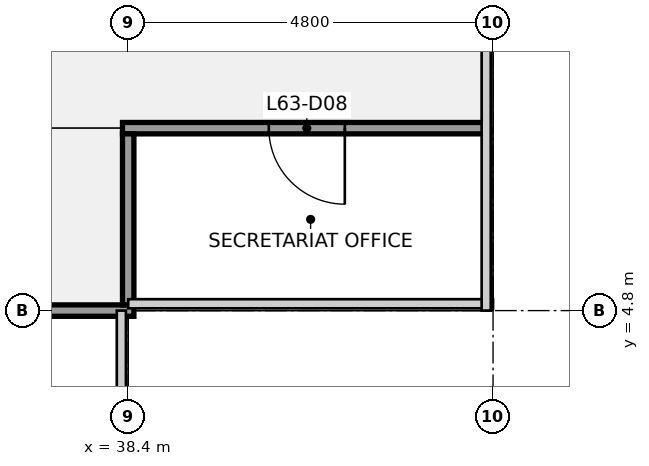
"""IFC4 building model, lengths in metres.
Left out: names, types, materials, properties, quantities, classifications, styles, units other than length and angle.
Written with IfcOpenShell. Run it as: python <this file> out.ifc"""

import sys

from ifc_helpers import new_model, si_unit, direction, frame, frame_2d, origin, place, context, subcontext, project, spatial, rectangle, extrude, element, fill, save


model = new_model("IFC4")
c1 = context("Model", 3, precision=1e-05, world=origin(), true_north=direction((0.0, 1.0)))
c2 = subcontext(c1, "Body", "Model", "MODEL_VIEW")
j1 = project(units=[si_unit("LENGTHUNIT", "METRE"), si_unit("PLANEANGLEUNIT", "RADIAN")], contexts=[c1])
p1 = place(None, origin())
s1 = spatial("IfcSite", under=j1, at=p1, CompositionType="ELEMENT")
p2 = place(p1, origin())
s2 = spatial("IfcBuilding", under=s1, at=p2, CompositionType="ELEMENT")
p3 = place(p2, frame((0.0, 0.0, 290.3)))
s3 = spatial("IfcBuildingStorey", under=s2, at=p3, CompositionType="ELEMENT", Elevation=290.3)
p4 = place(p3, frame((19.125, 4.8, 0.0), z_axis=(0.0, 0.0, 1.0), x_axis=(1.0, 0.0, 0.0)))
e1 = element("IfcWall", 1, at=p4, inside=s3, PredefinedType="PARTITIONING", context=c2, shape_type="SweptSolid", body=[
    extrude(rectangle(XDim=19.35, YDim=0.15, at=frame_2d((9.675, 0.0))), origin(), (0.0, 0.0, 1.0), 2.87),
])
p5 = place(p4, frame((0.775, 0.0, 0.0)))
e2 = element("IfcOpeningElement", 2, at=p5, cuts=e1, PredefinedType="OPENING", context=c2, shape_type="SweptSolid", body=[
    extrude(rectangle(XDim=1.0, YDim=2.1, at=frame_2d((0.5, 1.05))), frame((0.0, 0.085, 0.0), z_axis=(0.0, -1.0, 0.0), x_axis=(1.0, 0.0, 0.0)), (0.0, 0.0, 1.0), 0.17),
])
p6 = place(p4, frame((4.375, 0.0, 0.0)))
e3 = element("IfcOpeningElement", 3, at=p6, cuts=e1, PredefinedType="OPENING", context=c2, shape_type="SweptSolid", body=[
    extrude(rectangle(XDim=1.0, YDim=2.1, at=frame_2d((0.5, 1.05))), frame((0.0, 0.085, 0.0), z_axis=(0.0, -1.0, 0.0), x_axis=(1.0, 0.0, 0.0)), (0.0, 0.0, 1.0), 0.17),
])
p7 = place(p4, frame((7.975, 0.0, 0.0)))
e4 = element("IfcOpeningElement", 4, at=p7, cuts=e1, PredefinedType="OPENING", context=c2, shape_type="SweptSolid", body=[
    extrude(rectangle(XDim=1.0, YDim=2.1, at=frame_2d((0.5, 1.05))), frame((0.0, 0.085, 0.0), z_axis=(0.0, -1.0, 0.0), x_axis=(1.0, 0.0, 0.0)), (0.0, 0.0, 1.0), 0.17),
])
p8 = place(p4, frame((13.975, 0.0, 0.0)))
e5 = element("IfcOpeningElement", 5, at=p8, cuts=e1, PredefinedType="OPENING", context=c2, shape_type="SweptSolid", body=[
    extrude(rectangle(XDim=1.0, YDim=2.1, at=frame_2d((0.5, 1.05))), frame((0.0, 0.085, 0.0), z_axis=(0.0, -1.0, 0.0), x_axis=(1.0, 0.0, 0.0)), (0.0, 0.0, 1.0), 0.17),
])
p9 = place(p3, frame((38.325, 7.2, 0.0), z_axis=(0.0, 0.0, 1.0), x_axis=(1.0, 0.0, 0.0)))
e6 = element("IfcWall", 6, at=p9, inside=s3, PredefinedType="PARTITIONING", context=c2, shape_type="SweptSolid", body=[
    extrude(rectangle(XDim=4.775, YDim=0.15, at=frame_2d((2.388, 0.0))), origin(), (0.0, 0.0, 1.0), 2.87),
])
p10 = place(p9, frame((1.925, 0.0, 0.0)))
e7 = element("IfcOpeningElement", 7, at=p10, cuts=e6, PredefinedType="OPENING", context=c2, shape_type="SweptSolid", body=[
    extrude(rectangle(XDim=1.0, YDim=2.1, at=frame_2d((0.5, 1.05))), frame((0.0, 0.085, 0.0), z_axis=(0.0, -1.0, 0.0), x_axis=(1.0, 0.0, 0.0)), (0.0, 0.0, 1.0), 0.17),
])
p11 = place(p3, frame((38.4, 4.875, 0.0), z_axis=(0.0, 0.0, 1.0), x_axis=(0.0, 1.0, 0.0)))
e8 = element("IfcWall", 8, at=p11, inside=s3, PredefinedType="PARTITIONING", context=c2, shape_type="SweptSolid", body=[
    extrude(rectangle(XDim=2.25, YDim=0.15, at=frame_2d((1.125, 0.0))), origin(), (0.0, 0.0, 1.0), 2.87),
])
p12 = place(p10, origin())
e9 = element("IfcDoor", 9, at=p12, inside=s3, OperationType="SINGLE_SWING_RIGHT", PredefinedType="DOOR", context=c2, shape_type="SweptSolid", body=[
    extrude(rectangle(XDim=1.0, YDim=2.1, at=frame_2d((0.5, 1.05))), frame((0.0, 0.025, 0.0), z_axis=(0.0, -1.0, 0.0), x_axis=(1.0, 0.0, 0.0)), (0.0, 0.0, 1.0), 0.05),
])
fill(e7, e9)
save(model, sys.argv[1])
